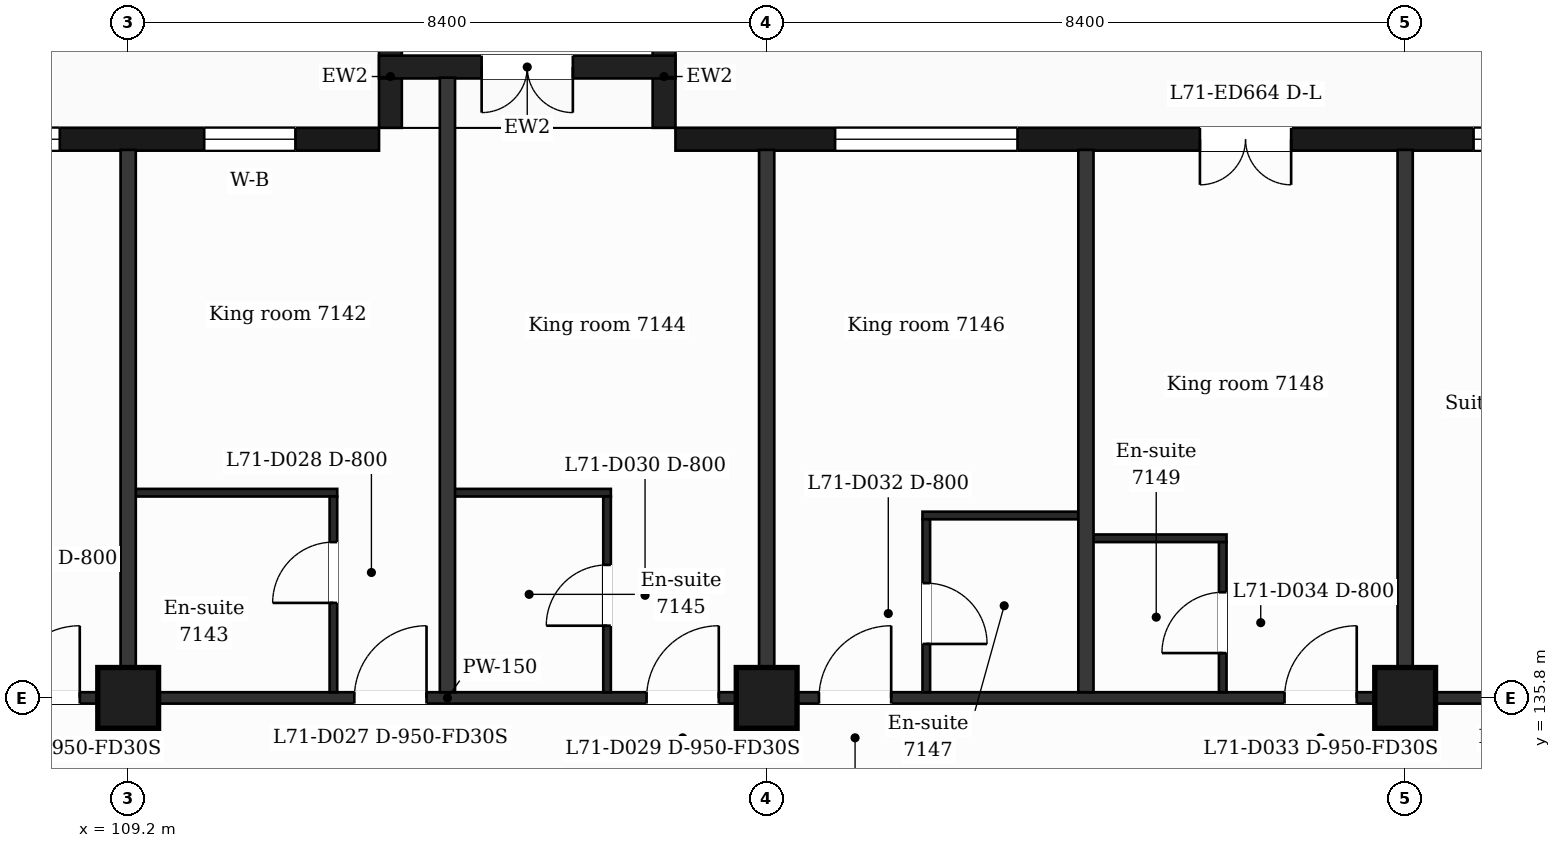
"""IFC4 building model, lengths in metres.
Left out: names, types, materials, properties, quantities, classifications, styles, units other than length and angle.
Written with IfcOpenShell. Run it as: python <this file> out.ifc"""

import sys

from ifc_helpers import new_model, si_unit, direction, frame, frame_2d, origin, origin_2d, place, context, subcontext, project, spatial, rectangle, extrude, element, fill, save


model = new_model("IFC4")
c1 = context("Model", 3, precision=1e-05, world=origin(), true_north=direction((0.0, 1.0)))
c2 = subcontext(c1, "Body", "Model", "MODEL_VIEW")
j1 = project(units=[si_unit("LENGTHUNIT", "METRE"), si_unit("PLANEANGLEUNIT", "RADIAN")], contexts=[c1])
p1 = place(None, origin())
s1 = spatial("IfcSite", under=j1, at=p1, CompositionType="ELEMENT")
p2 = place(p1, origin())
s2 = spatial("IfcBuilding", under=s1, at=p2, CompositionType="ELEMENT")
p3 = place(p2, frame((0.0, 0.0, 292.3)))
s3 = spatial("IfcBuildingStorey", under=s2, at=p3, CompositionType="ELEMENT", Elevation=292.3)
for number, where, z_axis, x_axis in (
    (1, (109.2, 135.8, 0.0), (0.0, 0.0, 1.0), (1.0, 0.0, 0.0)),
    (2, (117.6, 135.8, 0.0), (0.0, 0.0, 1.0), (1.0, 0.0, 0.0)),
    (3, (126.0, 135.8, 0.0), (0.0, 0.0, 1.0), (1.0, 0.0, 0.0)),
):
    element("IfcColumn", number, at=place(p3, frame(where, z_axis=z_axis, x_axis=x_axis)), inside=s3, PredefinedType="COLUMN", context=c2, shape_type="SweptSolid", body=[
        extrude(rectangle(XDim=0.8, YDim=0.8, at=origin_2d()), origin(), (0.0, 0.0, 1.0), 3.7),
    ])
p4 = place(p3, frame((130.65, 143.15, 0.0), z_axis=(0.0, 0.0, 1.0), x_axis=(-1.0, 0.0, 0.0)))
e4 = element("IfcWall", 4, at=p4, inside=s3, PredefinedType="SOLIDWALL", context=c2, shape_type="SweptSolid", body=[
    extrude(rectangle(XDim=14.25, YDim=0.3, at=frame_2d((7.125, 0.0))), origin(), (0.0, 0.0, 1.0), 3.38),
])
p5 = place(p4, frame((1.35, 0.0, 0.9)))
e5 = element("IfcOpeningElement", 5, at=p5, cuts=e4, PredefinedType="OPENING", context=c2, shape_type="SweptSolid", body=[
    extrude(rectangle(XDim=2.4, YDim=2.1, at=frame_2d((1.2, 1.05))), frame((0.0, 0.16, 0.0), z_axis=(0.0, -1.0, 0.0), x_axis=(1.0, 0.0, 0.0)), (0.0, 0.0, 1.0), 0.32),
])
p6 = place(p4, frame((6.15, 0.0, 0.0)))
e6 = element("IfcOpeningElement", 6, at=p6, cuts=e4, PredefinedType="OPENING", context=c2, shape_type="SweptSolid", body=[
    extrude(rectangle(XDim=1.2, YDim=2.4, at=frame_2d((0.6, 1.2))), frame((0.0, 0.16, 0.0), z_axis=(0.0, -1.0, 0.0), x_axis=(1.0, 0.0, 0.0)), (0.0, 0.0, 1.0), 0.32),
])
p7 = place(p4, frame((9.75, 0.0, 0.9)))
e7 = element("IfcOpeningElement", 7, at=p7, cuts=e4, PredefinedType="OPENING", context=c2, shape_type="SweptSolid", body=[
    extrude(rectangle(XDim=2.4, YDim=2.1, at=frame_2d((1.2, 1.05))), frame((0.0, 0.16, 0.0), z_axis=(0.0, -1.0, 0.0), x_axis=(1.0, 0.0, 0.0)), (0.0, 0.0, 1.0), 0.32),
])
p8 = place(p3, frame((112.5, 143.15, 0.0), z_axis=(0.0, 0.0, 1.0), x_axis=(-1.0, 0.0, 0.0)))
e8 = element("IfcWall", 8, at=p8, inside=s3, PredefinedType="SOLIDWALL", context=c2, shape_type="SweptSolid", body=[
    extrude(rectangle(XDim=16.5, YDim=0.3, at=frame_2d((8.25, 0.0))), origin(), (0.0, 0.0, 1.0), 3.38),
])
p9 = place(p8, frame((1.1, 0.0, 0.9)))
e9 = element("IfcOpeningElement", 9, at=p9, cuts=e8, PredefinedType="OPENING", context=c2, shape_type="SweptSolid", body=[
    extrude(rectangle(XDim=1.2, YDim=2.1, at=frame_2d((0.6, 1.05))), frame((0.0, 0.16, 0.0), z_axis=(0.0, -1.0, 0.0), x_axis=(1.0, 0.0, 0.0)), (0.0, 0.0, 1.0), 0.32),
])
p10 = place(p8, frame((4.2, 0.0, 0.9)))
e10 = element("IfcOpeningElement", 10, at=p10, cuts=e8, PredefinedType="OPENING", context=c2, shape_type="SweptSolid", body=[
    extrude(rectangle(XDim=2.4, YDim=2.1, at=frame_2d((1.2, 1.05))), frame((0.0, 0.16, 0.0), z_axis=(0.0, -1.0, 0.0), x_axis=(1.0, 0.0, 0.0)), (0.0, 0.0, 1.0), 0.32),
])
p11 = place(p8, frame((8.4, 0.0, 0.9)))
e11 = element("IfcOpeningElement", 11, at=p11, cuts=e8, PredefinedType="OPENING", context=c2, shape_type="SweptSolid", body=[
    extrude(rectangle(XDim=2.4, YDim=2.1, at=frame_2d((1.2, 1.05))), frame((0.0, 0.16, 0.0), z_axis=(0.0, -1.0, 0.0), x_axis=(1.0, 0.0, 0.0)), (0.0, 0.0, 1.0), 0.32),
])
p12 = place(p8, frame((12.3, 0.0, 0.0)))
e12 = element("IfcOpeningElement", 12, at=p12, cuts=e8, PredefinedType="OPENING", context=c2, shape_type="SweptSolid", body=[
    extrude(rectangle(XDim=1.2, YDim=2.4, at=frame_2d((0.6, 1.2))), frame((0.0, 0.16, 0.0), z_axis=(0.0, -1.0, 0.0), x_axis=(1.0, 0.0, 0.0)), (0.0, 0.0, 1.0), 0.32),
])
p13 = place(p8, frame((14.1, 0.0, 0.9)))
e13 = element("IfcOpeningElement", 13, at=p13, cuts=e8, PredefinedType="OPENING", context=c2, shape_type="SweptSolid", body=[
    extrude(rectangle(XDim=1.2, YDim=2.1, at=frame_2d((0.6, 1.05))), frame((0.0, 0.16, 0.0), z_axis=(0.0, -1.0, 0.0), x_axis=(1.0, 0.0, 0.0)), (0.0, 0.0, 1.0), 0.32),
])
for number, where, z_axis, x_axis in (
    (14, (116.25, 143.3, 0.0), (0.0, 0.0, 1.0), (0.0, 1.0, 0.0)),
    (15, (112.65, 143.3, 0.0), (0.0, 0.0, 1.0), (0.0, 1.0, 0.0)),
):
    element("IfcWall", number, at=place(p3, frame(where, z_axis=z_axis, x_axis=x_axis)), inside=s3, PredefinedType="SOLIDWALL", context=c2, shape_type="SweptSolid", body=[
        extrude(rectangle(XDim=1.35, YDim=0.3, at=frame_2d((0.675, 0.0))), origin(), (0.0, 0.0, 1.0), 3.38),
    ])
p14 = place(p3, frame((116.4, 144.1, 0.0), z_axis=(0.0, 0.0, 1.0), x_axis=(-1.0, 0.0, 0.0)))
e16 = element("IfcWall", 16, at=p14, inside=s3, PredefinedType="SOLIDWALL", context=c2, shape_type="SweptSolid", body=[
    extrude(rectangle(XDim=3.9, YDim=0.3, at=frame_2d((1.95, 0.0))), origin(), (0.0, 0.0, 1.0), 3.38),
])
p15 = place(p14, frame((1.35, 0.0, 0.0)))
e17 = element("IfcOpeningElement", 17, at=p15, cuts=e16, PredefinedType="OPENING", context=c2, shape_type="SweptSolid", body=[
    extrude(rectangle(XDim=1.2, YDim=2.4, at=frame_2d((0.6, 1.2))), frame((0.0, 0.16, 0.0), z_axis=(0.0, -1.0, 0.0), x_axis=(1.0, 0.0, 0.0)), (0.0, 0.0, 1.0), 0.32),
])
p16 = place(p3, frame((90.895, 135.8, 0.0), z_axis=(0.0, 0.0, 1.0), x_axis=(1.0, 0.0, 0.0)))
e18 = element("IfcWall", 18, at=p16, inside=s3, PredefinedType="PARTITIONING", context=c2, shape_type="SweptSolid", body=[
    extrude(rectangle(XDim=45.011, YDim=0.15, at=frame_2d((22.505, 0.0))), origin(), (0.0, 0.0, 1.0), 3.38),
])
p17 = place(p16, frame((6.906, 0.0, 0.0)))
e19 = element("IfcOpeningElement", 19, at=p17, cuts=e18, PredefinedType="OPENING", context=c2, shape_type="SweptSolid", body=[
    extrude(rectangle(XDim=1.0, YDim=2.1, at=frame_2d((0.5, 1.05))), frame((0.0, 0.085, 0.0), z_axis=(0.0, -1.0, 0.0), x_axis=(1.0, 0.0, 0.0)), (0.0, 0.0, 1.0), 0.17),
])
p18 = place(p16, frame((10.555, 0.0, 0.0)))
e20 = element("IfcOpeningElement", 20, at=p18, cuts=e18, PredefinedType="OPENING", context=c2, shape_type="SweptSolid", body=[
    extrude(rectangle(XDim=1.0, YDim=2.1, at=frame_2d((0.5, 1.05))), frame((0.0, 0.085, 0.0), z_axis=(0.0, -1.0, 0.0), x_axis=(1.0, 0.0, 0.0)), (0.0, 0.0, 1.0), 0.17),
])
p19 = place(p16, frame((16.719, 0.0, 0.0)))
e21 = element("IfcOpeningElement", 21, at=p19, cuts=e18, PredefinedType="OPENING", context=c2, shape_type="SweptSolid", body=[
    extrude(rectangle(XDim=0.95, YDim=2.1, at=frame_2d((0.475, 1.05))), frame((0.0, 0.085, 0.0), z_axis=(0.0, -1.0, 0.0), x_axis=(1.0, 0.0, 0.0)), (0.0, 0.0, 1.0), 0.17),
])
p20 = place(p16, frame((21.281, 0.0, 0.0)))
e22 = element("IfcOpeningElement", 22, at=p20, cuts=e18, PredefinedType="OPENING", context=c2, shape_type="SweptSolid", body=[
    extrude(rectangle(XDim=0.95, YDim=2.1, at=frame_2d((0.475, 1.05))), frame((0.0, 0.085, 0.0), z_axis=(0.0, -1.0, 0.0), x_axis=(1.0, 0.0, 0.0)), (0.0, 0.0, 1.0), 0.17),
])
p21 = place(p16, frame((25.125, 0.0, 0.0)))
e23 = element("IfcOpeningElement", 23, at=p21, cuts=e18, PredefinedType="OPENING", context=c2, shape_type="SweptSolid", body=[
    extrude(rectangle(XDim=0.95, YDim=2.1, at=frame_2d((0.475, 1.05))), frame((0.0, 0.085, 0.0), z_axis=(0.0, -1.0, 0.0), x_axis=(1.0, 0.0, 0.0)), (0.0, 0.0, 1.0), 0.17),
])
p22 = place(p16, frame((27.393, 0.0, 0.0)))
e24 = element("IfcOpeningElement", 24, at=p22, cuts=e18, PredefinedType="OPENING", context=c2, shape_type="SweptSolid", body=[
    extrude(rectangle(XDim=0.95, YDim=2.1, at=frame_2d((0.475, 1.05))), frame((0.0, 0.085, 0.0), z_axis=(0.0, -1.0, 0.0), x_axis=(1.0, 0.0, 0.0)), (0.0, 0.0, 1.0), 0.17),
])
p23 = place(p16, frame((33.518, 0.0, 0.0)))
e25 = element("IfcOpeningElement", 25, at=p23, cuts=e18, PredefinedType="OPENING", context=c2, shape_type="SweptSolid", body=[
    extrude(rectangle(XDim=0.95, YDim=2.1, at=frame_2d((0.475, 1.05))), frame((0.0, 0.085, 0.0), z_axis=(0.0, -1.0, 0.0), x_axis=(1.0, 0.0, 0.0)), (0.0, 0.0, 1.0), 0.17),
])
p24 = place(p16, frame((37.195, 0.0, 0.0)))
e26 = element("IfcOpeningElement", 26, at=p24, cuts=e18, PredefinedType="OPENING", context=c2, shape_type="SweptSolid", body=[
    extrude(rectangle(XDim=1.0, YDim=2.1, at=frame_2d((0.5, 1.05))), frame((0.0, 0.085, 0.0), z_axis=(0.0, -1.0, 0.0), x_axis=(1.0, 0.0, 0.0)), (0.0, 0.0, 1.0), 0.17),
])
p25 = place(p3, frame((121.8, 137.9, 0.0), z_axis=(0.0, 0.0, 1.0), x_axis=(1.0, 0.0, 0.0)))
e27 = element("IfcWall", 27, at=p25, inside=s3, PredefinedType="PARTITIONING", context=c2, shape_type="SweptSolid", body=[
    extrude(rectangle(XDim=1.85, YDim=0.1, at=frame_2d((0.925, 0.0))), origin(), (0.0, 0.0, 1.0), 3.38),
])
p26 = place(p3, frame((119.65, 138.2, 0.0), z_axis=(0.0, 0.0, 1.0), x_axis=(1.0, 0.0, 0.0)))
e28 = element("IfcWall", 28, at=p26, inside=s3, PredefinedType="PARTITIONING", context=c2, shape_type="SweptSolid", body=[
    extrude(rectangle(XDim=2.15, YDim=0.1, at=frame_2d((1.075, 0.0))), origin(), (0.0, 0.0, 1.0), 3.38),
])
p27 = place(p3, frame((109.2, 138.5, 0.0), z_axis=(0.0, 0.0, 1.0), x_axis=(1.0, 0.0, 0.0)))
e29 = element("IfcWall", 29, at=p27, inside=s3, PredefinedType="PARTITIONING", context=c2, shape_type="SweptSolid", body=[
    extrude(rectangle(XDim=2.75, YDim=0.1, at=frame_2d((1.375, 0.0))), origin(), (0.0, 0.0, 1.0), 3.38),
])
p28 = place(p3, frame((113.4, 138.5, 0.0), z_axis=(0.0, 0.0, 1.0), x_axis=(1.0, 0.0, 0.0)))
e30 = element("IfcWall", 30, at=p28, inside=s3, PredefinedType="PARTITIONING", context=c2, shape_type="SweptSolid", body=[
    extrude(rectangle(XDim=2.15, YDim=0.1, at=frame_2d((1.075, 0.0))), origin(), (0.0, 0.0, 1.0), 3.38),
])
p29 = place(p3, frame((109.2, 135.875, 0.0), z_axis=(0.0, 0.0, 1.0), x_axis=(0.0, 1.0, 0.0)))
e31 = element("IfcWall", 31, at=p29, inside=s3, PredefinedType="PARTITIONING", context=c2, shape_type="SweptSolid", body=[
    extrude(rectangle(XDim=7.135, YDim=0.2, at=frame_2d((3.567, 0.0))), origin(), (0.0, 0.0, 1.0), 3.38),
])
p30 = place(p3, frame((111.9, 135.875, 0.0), z_axis=(0.0, 0.0, 1.0), x_axis=(0.0, 1.0, 0.0)))
e32 = element("IfcWall", 32, at=p30, inside=s3, PredefinedType="PARTITIONING", context=c2, shape_type="SweptSolid", body=[
    extrude(rectangle(XDim=2.575, YDim=0.1, at=frame_2d((1.288, 0.0))), origin(), (0.0, 0.0, 1.0), 3.38),
])
p31 = place(p30, frame((1.175, 0.0, 0.0)))
e33 = element("IfcOpeningElement", 33, at=p31, cuts=e32, PredefinedType="OPENING", context=c2, shape_type="SweptSolid", body=[
    extrude(rectangle(XDim=0.8, YDim=2.1, at=frame_2d((0.4, 1.05))), frame((0.0, 0.06, 0.0), z_axis=(0.0, -1.0, 0.0), x_axis=(1.0, 0.0, 0.0)), (0.0, 0.0, 1.0), 0.12),
])
p32 = place(p3, frame((113.4, 135.875, 0.0), z_axis=(0.0, 0.0, 1.0), x_axis=(0.0, 1.0, 0.0)))
e34 = element("IfcWall", 34, at=p32, inside=s3, PredefinedType="PARTITIONING", context=c2, shape_type="SweptSolid", body=[
    extrude(rectangle(XDim=8.085, YDim=0.2, at=frame_2d((4.042, 0.0))), origin(), (0.0, 0.0, 1.0), 3.38),
])
p33 = place(p3, frame((115.5, 135.875, 0.0), z_axis=(0.0, 0.0, 1.0), x_axis=(0.0, 1.0, 0.0)))
e35 = element("IfcWall", 35, at=p33, inside=s3, PredefinedType="PARTITIONING", context=c2, shape_type="SweptSolid", body=[
    extrude(rectangle(XDim=2.575, YDim=0.1, at=frame_2d((1.288, 0.0))), origin(), (0.0, 0.0, 1.0), 3.38),
])
p34 = place(p33, frame((0.875, 0.0, 0.0)))
e36 = element("IfcOpeningElement", 36, at=p34, cuts=e35, PredefinedType="OPENING", context=c2, shape_type="SweptSolid", body=[
    extrude(rectangle(XDim=0.8, YDim=2.1, at=frame_2d((0.4, 1.05))), frame((0.0, 0.06, 0.0), z_axis=(0.0, -1.0, 0.0), x_axis=(1.0, 0.0, 0.0)), (0.0, 0.0, 1.0), 0.12),
])
p35 = place(p3, frame((117.6, 135.875, 0.0), z_axis=(0.0, 0.0, 1.0), x_axis=(0.0, 1.0, 0.0)))
e37 = element("IfcWall", 37, at=p35, inside=s3, PredefinedType="PARTITIONING", context=c2, shape_type="SweptSolid", body=[
    extrude(rectangle(XDim=7.135, YDim=0.2, at=frame_2d((3.567, 0.0))), origin(), (0.0, 0.0, 1.0), 3.38),
])
p36 = place(p3, frame((119.7, 135.875, 0.0), z_axis=(0.0, 0.0, 1.0), x_axis=(0.0, 1.0, 0.0)))
e38 = element("IfcWall", 38, at=p36, inside=s3, PredefinedType="PARTITIONING", context=c2, shape_type="SweptSolid", body=[
    extrude(rectangle(XDim=2.275, YDim=0.1, at=frame_2d((1.137, 0.0))), origin(), (0.0, 0.0, 1.0), 3.38),
])
p37 = place(p36, frame((0.635, 0.0, 0.0)))
e39 = element("IfcOpeningElement", 39, at=p37, cuts=e38, PredefinedType="OPENING", context=c2, shape_type="SweptSolid", body=[
    extrude(rectangle(XDim=0.8, YDim=2.1, at=frame_2d((0.4, 1.05))), frame((0.0, 0.06, 0.0), z_axis=(0.0, -1.0, 0.0), x_axis=(1.0, 0.0, 0.0)), (0.0, 0.0, 1.0), 0.12),
])
p38 = place(p3, frame((121.8, 135.875, 0.0), z_axis=(0.0, 0.0, 1.0), x_axis=(0.0, 1.0, 0.0)))
e40 = element("IfcWall", 40, at=p38, inside=s3, PredefinedType="PARTITIONING", context=c2, shape_type="SweptSolid", body=[
    extrude(rectangle(XDim=7.135, YDim=0.2, at=frame_2d((3.567, 0.0))), origin(), (0.0, 0.0, 1.0), 3.38),
])
p39 = place(p3, frame((123.6, 135.875, 0.0), z_axis=(0.0, 0.0, 1.0), x_axis=(0.0, 1.0, 0.0)))
e41 = element("IfcWall", 41, at=p39, inside=s3, PredefinedType="PARTITIONING", context=c2, shape_type="SweptSolid", body=[
    extrude(rectangle(XDim=1.975, YDim=0.1, at=frame_2d((0.988, 0.0))), origin(), (0.0, 0.0, 1.0), 3.38),
])
p40 = place(p39, frame((0.515, 0.0, 0.0)))
e42 = element("IfcOpeningElement", 42, at=p40, cuts=e41, PredefinedType="OPENING", context=c2, shape_type="SweptSolid", body=[
    extrude(rectangle(XDim=0.8, YDim=2.1, at=frame_2d((0.4, 1.05))), frame((0.0, 0.06, 0.0), z_axis=(0.0, -1.0, 0.0), x_axis=(1.0, 0.0, 0.0)), (0.0, 0.0, 1.0), 0.12),
])
p41 = place(p3, frame((126.0, 135.875, 0.0), z_axis=(0.0, 0.0, 1.0), x_axis=(0.0, 1.0, 0.0)))
e43 = element("IfcWall", 43, at=p41, inside=s3, PredefinedType="PARTITIONING", context=c2, shape_type="SweptSolid", body=[
    extrude(rectangle(XDim=7.135, YDim=0.2, at=frame_2d((3.567, 0.0))), origin(), (0.0, 0.0, 1.0), 3.38),
])
p42 = place(p5, origin())
e44 = element("IfcWindow", 44, at=p42, inside=s3, PartitioningType="SINGLE_PANEL", PredefinedType="WINDOW", context=c2, shape_type="SweptSolid", body=[
    extrude(rectangle(XDim=2.4, YDim=2.1, at=frame_2d((1.2, 1.05))), frame((0.0, 0.03, 0.0), z_axis=(0.0, -1.0, 0.0), x_axis=(1.0, 0.0, 0.0)), (0.0, 0.0, 1.0), 0.06),
])
fill(e5, e44)
p43 = place(p6, origin())
e45 = element("IfcDoor", 45, at=p43, inside=s3, OperationType="DOUBLE_DOOR_SINGLE_SWING", PredefinedType="DOOR", context=c2, shape_type="SweptSolid", body=[
    extrude(rectangle(XDim=1.2, YDim=2.4, at=frame_2d((0.6, 1.2))), frame((0.0, 0.025, 0.0), z_axis=(0.0, -1.0, 0.0), x_axis=(1.0, 0.0, 0.0)), (0.0, 0.0, 1.0), 0.05),
])
fill(e6, e45)
p44 = place(p7, origin())
e46 = element("IfcWindow", 46, at=p44, inside=s3, PartitioningType="SINGLE_PANEL", PredefinedType="WINDOW", context=c2, shape_type="SweptSolid", body=[
    extrude(rectangle(XDim=2.4, YDim=2.1, at=frame_2d((1.2, 1.05))), frame((0.0, 0.03, 0.0), z_axis=(0.0, -1.0, 0.0), x_axis=(1.0, 0.0, 0.0)), (0.0, 0.0, 1.0), 0.06),
])
fill(e7, e46)
p45 = place(p9, origin())
e47 = element("IfcWindow", 47, at=p45, inside=s3, PartitioningType="SINGLE_PANEL", PredefinedType="WINDOW", context=c2, shape_type="SweptSolid", body=[
    extrude(rectangle(XDim=1.2, YDim=2.1, at=frame_2d((0.6, 1.05))), frame((0.0, 0.03, 0.0), z_axis=(0.0, -1.0, 0.0), x_axis=(1.0, 0.0, 0.0)), (0.0, 0.0, 1.0), 0.06),
])
fill(e9, e47)
p46 = place(p10, origin())
e48 = element("IfcWindow", 48, at=p46, inside=s3, PartitioningType="SINGLE_PANEL", PredefinedType="WINDOW", context=c2, shape_type="SweptSolid", body=[
    extrude(rectangle(XDim=2.4, YDim=2.1, at=frame_2d((1.2, 1.05))), frame((0.0, 0.03, 0.0), z_axis=(0.0, -1.0, 0.0), x_axis=(1.0, 0.0, 0.0)), (0.0, 0.0, 1.0), 0.06),
])
fill(e10, e48)
p47 = place(p15, origin())
e49 = element("IfcDoor", 49, at=p47, inside=s3, OperationType="DOUBLE_DOOR_SINGLE_SWING", PredefinedType="DOOR", context=c2, shape_type="SweptSolid", body=[
    extrude(rectangle(XDim=1.2, YDim=2.4, at=frame_2d((0.6, 1.2))), frame((0.0, 0.025, 0.0), z_axis=(0.0, -1.0, 0.0), x_axis=(1.0, 0.0, 0.0)), (0.0, 0.0, 1.0), 0.05),
])
fill(e17, e49)
p48 = place(p19, origin())
e50 = element("IfcDoor", 50, at=p48, inside=s3, OperationType="SINGLE_SWING_RIGHT", PredefinedType="DOOR", context=c2, shape_type="SweptSolid", body=[
    extrude(rectangle(XDim=0.95, YDim=2.1, at=frame_2d((0.475, 1.05))), frame((0.0, 0.025, 0.0), z_axis=(0.0, -1.0, 0.0), x_axis=(1.0, 0.0, 0.0)), (0.0, 0.0, 1.0), 0.05),
])
fill(e21, e50)
p49 = place(p20, origin())
e51 = element("IfcDoor", 51, at=p49, inside=s3, OperationType="SINGLE_SWING_RIGHT", PredefinedType="DOOR", context=c2, shape_type="SweptSolid", body=[
    extrude(rectangle(XDim=0.95, YDim=2.1, at=frame_2d((0.475, 1.05))), frame((0.0, 0.025, 0.0), z_axis=(0.0, -1.0, 0.0), x_axis=(1.0, 0.0, 0.0)), (0.0, 0.0, 1.0), 0.05),
])
fill(e22, e51)
p50 = place(p31, origin())
e52 = element("IfcDoor", 52, at=p50, inside=s3, OperationType="SINGLE_SWING_LEFT", PredefinedType="DOOR", context=c2, shape_type="SweptSolid", body=[
    extrude(rectangle(XDim=0.8, YDim=2.1, at=frame_2d((0.4, 1.05))), frame((0.0, 0.025, 0.0), z_axis=(0.0, -1.0, 0.0), x_axis=(1.0, 0.0, 0.0)), (0.0, 0.0, 1.0), 0.05),
])
fill(e33, e52)
p51 = place(p21, origin())
e53 = element("IfcDoor", 53, at=p51, inside=s3, OperationType="SINGLE_SWING_RIGHT", PredefinedType="DOOR", context=c2, shape_type="SweptSolid", body=[
    extrude(rectangle(XDim=0.95, YDim=2.1, at=frame_2d((0.475, 1.05))), frame((0.0, 0.025, 0.0), z_axis=(0.0, -1.0, 0.0), x_axis=(1.0, 0.0, 0.0)), (0.0, 0.0, 1.0), 0.05),
])
fill(e23, e53)
p52 = place(p34, origin())
e54 = element("IfcDoor", 54, at=p52, inside=s3, OperationType="SINGLE_SWING_LEFT", PredefinedType="DOOR", context=c2, shape_type="SweptSolid", body=[
    extrude(rectangle(XDim=0.8, YDim=2.1, at=frame_2d((0.4, 1.05))), frame((0.0, 0.025, 0.0), z_axis=(0.0, -1.0, 0.0), x_axis=(1.0, 0.0, 0.0)), (0.0, 0.0, 1.0), 0.05),
])
fill(e36, e54)
p53 = place(p22, origin())
e55 = element("IfcDoor", 55, at=p53, inside=s3, OperationType="SINGLE_SWING_RIGHT", PredefinedType="DOOR", context=c2, shape_type="SweptSolid", body=[
    extrude(rectangle(XDim=0.95, YDim=2.1, at=frame_2d((0.475, 1.05))), frame((0.0, 0.025, 0.0), z_axis=(0.0, -1.0, 0.0), x_axis=(1.0, 0.0, 0.0)), (0.0, 0.0, 1.0), 0.05),
])
fill(e24, e55)
p54 = place(p37, origin())
e56 = element("IfcDoor", 56, at=p54, inside=s3, OperationType="SINGLE_SWING_LEFT", PredefinedType="DOOR", context=c2, shape_type="SweptSolid", body=[
    extrude(rectangle(XDim=0.8, YDim=2.1, at=frame_2d((0.4, 1.05))), frame((0.0, 0.025, 0.0), z_axis=(0.0, -1.0, 0.0), x_axis=(1.0, 0.0, 0.0)), (0.0, 0.0, 1.0), 0.05),
])
fill(e39, e56)
p55 = place(p23, origin())
e57 = element("IfcDoor", 57, at=p55, inside=s3, OperationType="SINGLE_SWING_RIGHT", PredefinedType="DOOR", context=c2, shape_type="SweptSolid", body=[
    extrude(rectangle(XDim=0.95, YDim=2.1, at=frame_2d((0.475, 1.05))), frame((0.0, 0.025, 0.0), z_axis=(0.0, -1.0, 0.0), x_axis=(1.0, 0.0, 0.0)), (0.0, 0.0, 1.0), 0.05),
])
fill(e25, e57)
p56 = place(p40, origin())
e58 = element("IfcDoor", 58, at=p56, inside=s3, OperationType="SINGLE_SWING_LEFT", PredefinedType="DOOR", context=c2, shape_type="SweptSolid", body=[
    extrude(rectangle(XDim=0.8, YDim=2.1, at=frame_2d((0.4, 1.05))), frame((0.0, 0.025, 0.0), z_axis=(0.0, -1.0, 0.0), x_axis=(1.0, 0.0, 0.0)), (0.0, 0.0, 1.0), 0.05),
])
fill(e42, e58)
save(model, sys.argv[1])
